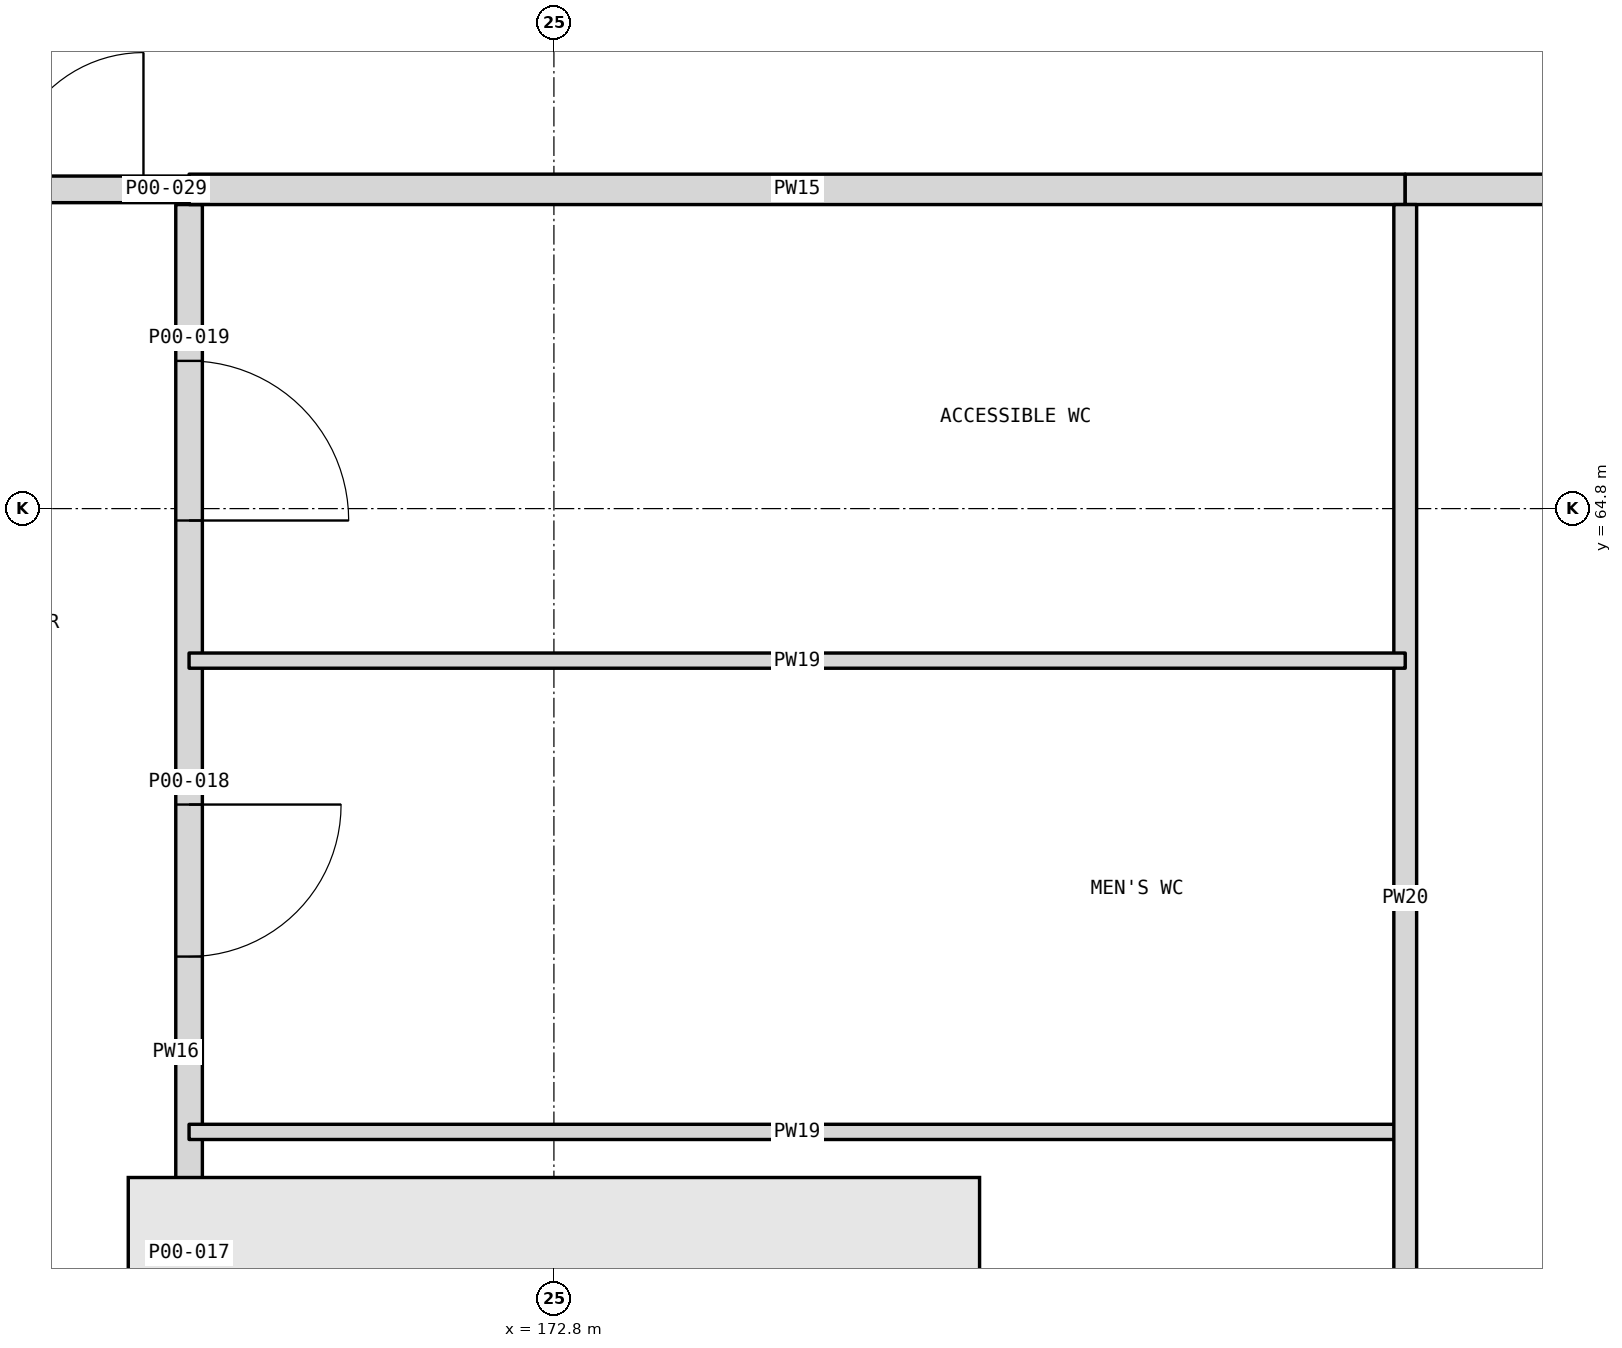
"""IFC4 building model, lengths in metres.
Left out: names, types, materials, properties, quantities, classifications, styles, units other than length and angle.
Written with IfcOpenShell. Run it as: python <this file> out.ifc"""

import sys

from ifc_helpers import new_model, si_unit, direction, frame, frame_2d, origin, place, context, subcontext, project, spatial, rectangle, extrude, element, fill, save


model = new_model("IFC4")
c1 = context("Model", 3, precision=1e-05, world=origin(), true_north=direction((0.0, 1.0)))
c2 = subcontext(c1, "Body", "Model", "MODEL_VIEW")
j1 = project(units=[si_unit("LENGTHUNIT", "METRE"), si_unit("PLANEANGLEUNIT", "RADIAN")], contexts=[c1])
p1 = place(None, origin())
s1 = spatial("IfcSite", under=j1, at=p1, CompositionType="ELEMENT")
p2 = place(p1, origin())
s2 = spatial("IfcBuilding", under=s1, at=p2, CompositionType="ELEMENT")
p3 = place(p2, origin())
s3 = spatial("IfcBuildingStorey", under=s2, at=p3, CompositionType="ELEMENT", Elevation=0.0)
p4 = place(p3, frame((170.4, 15.0, 0.0), z_axis=(0.0, 0.0, 1.0), x_axis=(0.0, 1.0, 0.0)))
e1 = element("IfcWall", 1, at=p4, inside=s3, PredefinedType="PARTITIONING", context=c2, shape_type="SweptSolid", body=[
    extrude(rectangle(XDim=51.8, YDim=0.175, at=frame_2d((25.9, 0.0))), origin(), (0.0, 0.0, 1.0), 5.5),
])
p5 = place(p4, frame((11.95, 0.0, 0.0)))
e2 = element("IfcOpeningElement", 2, at=p5, cuts=e1, PredefinedType="OPENING", context=c2, shape_type="SweptSolid", body=[
    extrude(rectangle(XDim=2.1, YDim=2.1, at=frame_2d((1.05, 1.05))), frame((0.0, 0.097, 0.0), z_axis=(0.0, -1.0, 0.0), x_axis=(1.0, 0.0, 0.0)), (0.0, 0.0, 1.0), 0.195),
])
p6 = place(p4, frame((21.95, 0.0, 0.0)))
e3 = element("IfcOpeningElement", 3, at=p6, cuts=e1, PredefinedType="OPENING", context=c2, shape_type="SweptSolid", body=[
    extrude(rectangle(XDim=2.1, YDim=2.1, at=frame_2d((1.05, 1.05))), frame((0.0, 0.097, 0.0), z_axis=(0.0, -1.0, 0.0), x_axis=(1.0, 0.0, 0.0)), (0.0, 0.0, 1.0), 0.195),
])
p7 = place(p4, frame((36.1, 0.0, 0.0)))
e4 = element("IfcOpeningElement", 4, at=p7, cuts=e1, PredefinedType="OPENING", context=c2, shape_type="SweptSolid", body=[
    extrude(rectangle(XDim=1.0, YDim=2.1, at=frame_2d((0.5, 1.05))), frame((0.0, 0.097, 0.0), z_axis=(0.0, -1.0, 0.0), x_axis=(1.0, 0.0, 0.0)), (0.0, 0.0, 1.0), 0.195),
])
p8 = place(p4, frame((43.753, 0.0, 0.0)))
e5 = element("IfcOpeningElement", 5, at=p8, cuts=e1, PredefinedType="OPENING", context=c2, shape_type="SweptSolid", body=[
    extrude(rectangle(XDim=1.0, YDim=2.1, at=frame_2d((0.5, 1.05))), frame((0.0, 0.097, 0.0), z_axis=(0.0, -1.0, 0.0), x_axis=(1.0, 0.0, 0.0)), (0.0, 0.0, 1.0), 0.195),
])
p9 = place(p4, frame((46.853, 0.0, 0.0)))
e6 = element("IfcOpeningElement", 6, at=p9, cuts=e1, PredefinedType="OPENING", context=c2, shape_type="SweptSolid", body=[
    extrude(rectangle(XDim=1.0, YDim=2.1, at=frame_2d((0.5, 1.05))), frame((0.0, 0.097, 0.0), z_axis=(0.0, -1.0, 0.0), x_axis=(1.0, 0.0, 0.0)), (0.0, 0.0, 1.0), 0.195),
])
p10 = place(p4, frame((49.722, 0.0, 0.0)))
e7 = element("IfcOpeningElement", 7, at=p10, cuts=e1, PredefinedType="OPENING", context=c2, shape_type="SweptSolid", body=[
    extrude(rectangle(XDim=1.05, YDim=2.1, at=frame_2d((0.525, 1.05))), frame((0.0, 0.097, 0.0), z_axis=(0.0, -1.0, 0.0), x_axis=(1.0, 0.0, 0.0)), (0.0, 0.0, 1.0), 0.195),
])
p11 = place(p3, frame((168.087, 66.9, 0.0), z_axis=(0.0, 0.0, 1.0), x_axis=(1.0, 0.0, 0.0)))
e8 = element("IfcWall", 8, at=p11, inside=s3, PredefinedType="PARTITIONING", context=c2, shape_type="SweptSolid", body=[
    extrude(rectangle(XDim=2.312, YDim=0.175, at=frame_2d((1.156, 0.0))), origin(), (0.0, 0.0, 1.0), 5.5),
])
p12 = place(p11, frame((0.212, 0.0, 0.0)))
e9 = element("IfcOpeningElement", 9, at=p12, cuts=e8, PredefinedType="OPENING", context=c2, shape_type="SweptSolid", body=[
    extrude(rectangle(XDim=1.8, YDim=2.1, at=frame_2d((0.9, 1.05))), frame((0.0, 0.097, 0.0), z_axis=(0.0, -1.0, 0.0), x_axis=(1.0, 0.0, 0.0)), (0.0, 0.0, 1.0), 0.195),
])
p13 = place(p3, frame((170.4, 66.9, 0.0), z_axis=(0.0, 0.0, 1.0), x_axis=(1.0, 0.0, 0.0)))
e10 = element("IfcWall", 10, at=p13, inside=s3, PredefinedType="PARTITIONING", context=c2, shape_type="SweptSolid", body=[
    extrude(rectangle(XDim=8.0, YDim=0.2, at=frame_2d((4.0, 0.0))), origin(), (0.0, 0.0, 1.0), 5.5),
])
p14 = place(p3, frame((178.4, 66.9, 0.0), z_axis=(0.0, 0.0, 1.0), x_axis=(1.0, 0.0, 0.0)))
e11 = element("IfcWall", 11, at=p14, inside=s3, PredefinedType="PARTITIONING", context=c2, shape_type="SweptSolid", body=[
    extrude(rectangle(XDim=1.6, YDim=0.2, at=frame_2d((0.8, 0.0))), origin(), (0.0, 0.0, 1.0), 5.5),
])
p15 = place(p3, frame((170.4, 60.7, 0.0), z_axis=(0.0, 0.0, 1.0), x_axis=(1.0, 0.0, 0.0)))
e12 = element("IfcWall", 12, at=p15, inside=s3, PredefinedType="PARTITIONING", context=c2, shape_type="SweptSolid", body=[
    extrude(rectangle(XDim=8.0, YDim=0.1, at=frame_2d((4.0, 0.0))), origin(), (0.0, 0.0, 1.0), 5.5),
])
p16 = place(p3, frame((178.4, 57.675, 0.0), z_axis=(0.0, 0.0, 1.0), x_axis=(0.0, 1.0, 0.0)))
e13 = element("IfcWall", 13, at=p16, inside=s3, PredefinedType="PARTITIONING", context=c2, shape_type="SweptSolid", body=[
    extrude(rectangle(XDim=9.125, YDim=0.15, at=frame_2d((4.562, 0.0))), origin(), (0.0, 0.0, 1.0), 5.5),
])
p17 = place(p3, frame((170.4, 63.8, 0.0), z_axis=(0.0, 0.0, 1.0), x_axis=(1.0, 0.0, 0.0)))
e14 = element("IfcWall", 14, at=p17, inside=s3, PredefinedType="PARTITIONING", context=c2, shape_type="SweptSolid", body=[
    extrude(rectangle(XDim=8.0, YDim=0.1, at=frame_2d((4.0, 0.0))), origin(), (0.0, 0.0, 1.0), 5.5),
])
p18 = place(p9, frame((1.0, 0.0, 0.0), z_axis=(0.0, 0.0, 1.0), x_axis=(-1.0, 0.0, 0.0)))
e15 = element("IfcDoor", 15, at=p18, inside=s3, OperationType="SINGLE_SWING_LEFT", PredefinedType="DOOR", context=c2, shape_type="SweptSolid", body=[
    extrude(rectangle(XDim=1.0, YDim=2.1, at=frame_2d((0.5, 1.05))), frame((0.0, 0.025, 0.0), z_axis=(0.0, -1.0, 0.0), x_axis=(1.0, 0.0, 0.0)), (0.0, 0.0, 1.0), 0.05),
])
fill(e6, e15)
p19 = place(p10, frame((1.05, 0.0, 0.0), z_axis=(0.0, 0.0, 1.0), x_axis=(-1.0, 0.0, 0.0)))
e16 = element("IfcDoor", 16, at=p19, inside=s3, OperationType="SINGLE_SWING_RIGHT", PredefinedType="DOOR", context=c2, shape_type="SweptSolid", body=[
    extrude(rectangle(XDim=1.05, YDim=2.1, at=frame_2d((0.525, 1.05))), frame((0.0, 0.025, 0.0), z_axis=(0.0, -1.0, 0.0), x_axis=(1.0, 0.0, 0.0)), (0.0, 0.0, 1.0), 0.05),
])
fill(e7, e16)
p20 = place(p12, origin())
e17 = element("IfcDoor", 17, at=p20, inside=s3, OperationType="DOUBLE_DOOR_SINGLE_SWING", PredefinedType="DOOR", context=c2, shape_type="SweptSolid", body=[
    extrude(rectangle(XDim=1.8, YDim=2.1, at=frame_2d((0.9, 1.05))), frame((0.0, 0.025, 0.0), z_axis=(0.0, -1.0, 0.0), x_axis=(1.0, 0.0, 0.0)), (0.0, 0.0, 1.0), 0.05),
])
fill(e9, e17)
save(model, sys.argv[1])
